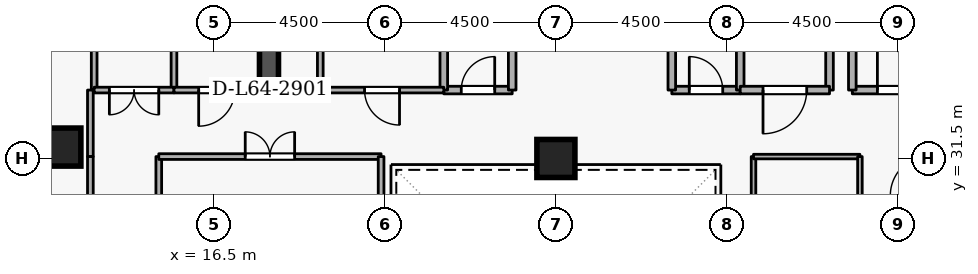
"""IFC4 building model, lengths in metres.
Left out: names, types, materials, properties, quantities, classifications, styles, units other than length and angle.
Written with IfcOpenShell. Run it as: python <this file> out.ifc"""

import sys

from ifc_helpers import new_model, si_unit, direction, frame, frame_2d, origin, origin_2d, place, context, subcontext, project, spatial, rectangle, extrude, element, fill, save


model = new_model("IFC4")
c1 = context("Model", 3, precision=1e-05, world=origin(), true_north=direction((0.0, 1.0)))
c2 = subcontext(c1, "Body", "Model", "MODEL_VIEW")
j1 = project(units=[si_unit("LENGTHUNIT", "METRE"), si_unit("PLANEANGLEUNIT", "RADIAN")], contexts=[c1])
p1 = place(None, origin())
s1 = spatial("IfcSite", under=j1, at=p1, CompositionType="ELEMENT")
p2 = place(p1, origin())
s2 = spatial("IfcBuilding", under=s1, at=p2, CompositionType="ELEMENT")
p3 = place(p2, frame((0.0, 0.0, 240.3)))
s3 = spatial("IfcBuildingStorey", under=s2, at=p3, CompositionType="ELEMENT", Elevation=240.3)
p4 = place(p3, frame((17.95, 33.1, 0.0), z_axis=(0.0, 0.0, 1.0), x_axis=(0.0, 1.0, 0.0)))
e1 = element("IfcWall", 1, at=p4, inside=s3, PredefinedType="SHEAR", context=c2, shape_type="SweptSolid", body=[
    extrude(rectangle(XDim=5.8, YDim=0.5, at=frame_2d((2.9, 0.0))), origin(), (0.0, 0.0, 1.0), 3.6),
])
for number, where, z_axis, x_axis in (
    (2, (12.5, 31.8, 0.0), (0.0, 0.0, 1.0), (1.0, 0.0, 0.0)),
    (3, (25.5, 31.5, 0.0), (0.0, 0.0, 1.0), (1.0, 0.0, 0.0)),
):
    element("IfcColumn", number, at=place(p3, frame(where, z_axis=z_axis, x_axis=x_axis)), inside=s3, PredefinedType="COLUMN", context=c2, shape_type="SweptSolid", body=[
        extrude(rectangle(XDim=1.0, YDim=1.0, at=origin_2d()), origin(), (0.0, 0.0, 1.0), 3.6),
    ])
p5 = place(p3, frame((33.3, 33.3, 0.0), z_axis=(0.0, 0.0, 1.0), x_axis=(1.0, 0.0, 0.0)))
e4 = element("IfcWall", 4, at=p5, inside=s3, PredefinedType="STANDARD", context=c2, shape_type="SweptSolid", body=[
    extrude(rectangle(XDim=2.5, YDim=0.2, at=frame_2d((1.25, 0.0))), origin(), (0.0, 0.0, 1.0), 3.34),
])
p6 = place(p5, frame((0.66, 0.0, 0.0)))
e5 = element("IfcOpeningElement", 5, at=p6, cuts=e4, PredefinedType="OPENING", context=c2, shape_type="SweptSolid", body=[
    extrude(rectangle(XDim=1.15, YDim=2.1, at=frame_2d((0.575, 1.05))), frame((0.0, 0.11, 0.0), z_axis=(0.0, -1.0, 0.0), x_axis=(1.0, 0.0, 0.0)), (0.0, 0.0, 1.0), 0.22),
])
p7 = place(p3, frame((33.3, 35.6, 0.0), z_axis=(0.0, 0.0, 1.0), x_axis=(0.0, -1.0, 0.0)))
e6 = element("IfcWall", 6, at=p7, inside=s3, PredefinedType="STANDARD", context=c2, shape_type="SweptSolid", body=[
    extrude(rectangle(XDim=2.3, YDim=0.2, at=frame_2d((1.15, 0.0))), origin(), (0.0, 0.0, 1.0), 2.545),
])
p8 = place(p3, frame((22.55, 33.3, 0.0), z_axis=(0.0, 0.0, 1.0), x_axis=(1.0, 0.0, 0.0)))
e7 = element("IfcWall", 7, at=p8, inside=s3, PredefinedType="STANDARD", context=c2, shape_type="SweptSolid", body=[
    extrude(rectangle(XDim=1.8, YDim=0.2, at=frame_2d((0.9, 0.0))), origin(), (0.0, 0.0, 1.0), 3.34),
])
p9 = place(p8, frame((0.46, 0.0, 0.0)))
e8 = element("IfcOpeningElement", 8, at=p9, cuts=e7, PredefinedType="OPENING", context=c2, shape_type="SweptSolid", body=[
    extrude(rectangle(XDim=0.88, YDim=2.04, at=frame_2d((0.44, 1.02))), frame((0.0, 0.11, 0.0), z_axis=(0.0, -1.0, 0.0), x_axis=(1.0, 0.0, 0.0)), (0.0, 0.0, 1.0), 0.22),
])
for number, where, z_axis, x_axis in (
    (9, (24.35, 33.3, 0.0), (0.0, 0.0, 1.0), (0.0, 1.0, 0.0)),
    (10, (22.55, 35.35, 0.0), (0.0, 0.0, 1.0), (0.0, -1.0, 0.0)),
):
    element("IfcWall", number, at=place(p3, frame(where, z_axis=z_axis, x_axis=x_axis)), inside=s3, PredefinedType="STANDARD", context=c2, shape_type="SweptSolid", body=[
        extrude(rectangle(XDim=2.05, YDim=0.2, at=frame_2d((1.025, 0.0))), origin(), (0.0, 0.0, 1.0), 3.34),
    ])
p10 = place(p3, frame((28.55, 33.3, 0.0), z_axis=(0.0, 0.0, 1.0), x_axis=(1.0, 0.0, 0.0)))
e11 = element("IfcWall", 11, at=p10, inside=s3, PredefinedType="STANDARD", context=c2, shape_type="SweptSolid", body=[
    extrude(rectangle(XDim=1.8, YDim=0.2, at=frame_2d((0.9, 0.0))), origin(), (0.0, 0.0, 1.0), 3.34),
])
p11 = place(p10, frame((0.46, 0.0, 0.0)))
e12 = element("IfcOpeningElement", 12, at=p11, cuts=e11, PredefinedType="OPENING", context=c2, shape_type="SweptSolid", body=[
    extrude(rectangle(XDim=0.88, YDim=2.04, at=frame_2d((0.44, 1.02))), frame((0.0, 0.11, 0.0), z_axis=(0.0, -1.0, 0.0), x_axis=(1.0, 0.0, 0.0)), (0.0, 0.0, 1.0), 0.22),
])
for number, where, z_axis, x_axis in (
    (13, (30.35, 33.3, 0.0), (0.0, 0.0, 1.0), (0.0, 1.0, 0.0)),
    (14, (28.55, 35.35, 0.0), (0.0, 0.0, 1.0), (0.0, -1.0, 0.0)),
):
    element("IfcWall", number, at=place(p3, frame(where, z_axis=z_axis, x_axis=x_axis)), inside=s3, PredefinedType="STANDARD", context=c2, shape_type="SweptSolid", body=[
        extrude(rectangle(XDim=2.05, YDim=0.2, at=frame_2d((1.025, 0.0))), origin(), (0.0, 0.0, 1.0), 3.34),
    ])
p12 = place(p3, frame((32.7, 35.35, 0.0), z_axis=(0.0, 0.0, 1.0), x_axis=(0.0, -1.0, 0.0)))
e15 = element("IfcWall", 15, at=p12, inside=s3, PredefinedType="STANDARD", context=c2, shape_type="SweptSolid", body=[
    extrude(rectangle(XDim=2.05, YDim=0.2, at=frame_2d((1.025, 0.0))), origin(), (0.0, 0.0, 1.0), 2.545),
])
p13 = place(p3, frame((32.7, 33.3, 0.0), z_axis=(0.0, 0.0, 1.0), x_axis=(-1.0, 0.0, 0.0)))
e16 = element("IfcWall", 16, at=p13, inside=s3, PredefinedType="STANDARD", context=c2, shape_type="SweptSolid", body=[
    extrude(rectangle(XDim=2.35, YDim=0.2, at=frame_2d((1.175, 0.0))), origin(), (0.0, 0.0, 1.0), 3.34),
])
p14 = place(p13, frame((0.6, 0.0, 0.0)))
e17 = element("IfcOpeningElement", 17, at=p14, cuts=e16, PredefinedType="OPENING", context=c2, shape_type="SweptSolid", body=[
    extrude(rectangle(XDim=1.15, YDim=2.1, at=frame_2d((0.575, 1.05))), frame((0.0, 0.11, 0.0), z_axis=(0.0, -1.0, 0.0), x_axis=(1.0, 0.0, 0.0)), (0.0, 0.0, 1.0), 0.22),
])
p15 = place(p3, frame((19.3, 33.3, 0.0), z_axis=(0.0, 0.0, 1.0), x_axis=(0.0, 1.0, 0.0)))
e18 = element("IfcWall", 18, at=p15, inside=s3, PredefinedType="PARTITIONING", context=c2, shape_type="SweptSolid", body=[
    extrude(rectangle(XDim=2.05, YDim=0.15, at=frame_2d((1.025, 0.0))), origin(), (0.0, 0.0, 1.0), 3.34),
])
p16 = place(p3, frame((22.55, 33.3, 0.0), z_axis=(0.0, 0.0, 1.0), x_axis=(-1.0, 0.0, 0.0)))
e19 = element("IfcWall", 19, at=p16, inside=s3, PredefinedType="PARTITIONING", context=c2, shape_type="SweptSolid", body=[
    extrude(rectangle(XDim=3.25, YDim=0.15, at=frame_2d((1.625, 0.0))), origin(), (0.0, 0.0, 1.0), 3.34),
])
p17 = place(p16, frame((1.165, 0.0, 0.0)))
e20 = element("IfcOpeningElement", 20, at=p17, cuts=e19, PredefinedType="OPENING", context=c2, shape_type="SweptSolid", body=[
    extrude(rectangle(XDim=0.92, YDim=2.08, at=frame_2d((0.46, 1.04))), frame((0.0, 0.085, 0.0), z_axis=(0.0, -1.0, 0.0), x_axis=(1.0, 0.0, 0.0)), (0.0, 0.0, 1.0), 0.17),
])
for number, where, z_axis, x_axis in (
    (21, (13.35, 33.3, 0.0), (0.0, 0.0, 1.0), (0.0, 1.0, 0.0)),
    (22, (15.45, 44.72, 0.0), (0.0, 0.0, 1.0), (0.0, -1.0, 0.0)),
):
    element("IfcWall", number, at=place(p3, frame(where, z_axis=z_axis, x_axis=x_axis)), inside=s3, PredefinedType="PARTITIONING", context=c2, shape_type="SweptSolid", body=[
        extrude(rectangle(XDim=11.42, YDim=0.15, at=frame_2d((5.71, 0.0))), origin(), (0.0, 0.0, 1.0), 3.34),
    ])
p18 = place(p3, frame((15.45, 33.3, 0.0), z_axis=(0.0, 0.0, 1.0), x_axis=(-1.0, 0.0, 0.0)))
e23 = element("IfcWall", 23, at=p18, inside=s3, PredefinedType="PARTITIONING", context=c2, shape_type="SweptSolid", body=[
    extrude(rectangle(XDim=2.1, YDim=0.15, at=frame_2d((1.05, 0.0))), origin(), (0.0, 0.0, 1.0), 3.34),
])
p19 = place(p18, frame((0.4, 0.0, 0.0)))
e24 = element("IfcOpeningElement", 24, at=p19, cuts=e23, PredefinedType="OPENING", context=c2, shape_type="SweptSolid", body=[
    extrude(rectangle(XDim=1.3, YDim=2.12, at=frame_2d((0.65, 1.06))), frame((0.0, 0.085, 0.0), z_axis=(0.0, -1.0, 0.0), x_axis=(1.0, 0.0, 0.0)), (0.0, 0.0, 1.0), 0.17),
])
p20 = place(p3, frame((17.7, 33.3, 0.0), z_axis=(0.0, 0.0, 1.0), x_axis=(-1.0, 0.0, 0.0)))
e25 = element("IfcWall", 25, at=p20, inside=s3, PredefinedType="PARTITIONING", context=c2, shape_type="SweptSolid", body=[
    extrude(rectangle(XDim=2.25, YDim=0.15, at=frame_2d((1.125, 0.0))), origin(), (0.0, 0.0, 1.0), 3.34),
])
p21 = place(p20, frame((0.65, 0.0, 0.0)))
e26 = element("IfcOpeningElement", 26, at=p21, cuts=e25, PredefinedType="OPENING", context=c2, shape_type="SweptSolid", body=[
    extrude(rectangle(XDim=0.95, YDim=2.1, at=frame_2d((0.475, 1.05))), frame((0.0, 0.085, 0.0), z_axis=(0.0, -1.0, 0.0), x_axis=(1.0, 0.0, 0.0)), (0.0, 0.0, 1.0), 0.17),
])
p22 = place(p3, frame((13.25, 33.3, 0.0), z_axis=(0.0, 0.0, 1.0), x_axis=(0.0, -1.0, 0.0)))
e27 = element("IfcWall", 27, at=p22, inside=s3, PredefinedType="PARTITIONING", context=c2, shape_type="SweptSolid", body=[
    extrude(rectangle(XDim=1.75, YDim=0.15, at=frame_2d((0.875, 0.0))), origin(), (0.0, 0.0, 1.0), 3.34),
])
p23 = place(p3, frame((13.25, 31.55, 0.0), z_axis=(0.0, 0.0, 1.0), x_axis=(0.0, -1.0, 0.0)))
e28 = element("IfcWall", 28, at=p23, inside=s3, PredefinedType="PARTITIONING", context=c2, shape_type="SweptSolid", body=[
    extrude(rectangle(XDim=3.35, YDim=0.15, at=frame_2d((1.675, 0.0))), origin(), (0.0, 0.0, 1.0), 3.34),
])
p24 = place(p23, frame((1.025, 0.0, 0.0)))
e29 = element("IfcOpeningElement", 29, at=p24, cuts=e28, PredefinedType="OPENING", context=c2, shape_type="SweptSolid", body=[
    extrude(rectangle(XDim=1.3, YDim=2.12, at=frame_2d((0.65, 1.06))), frame((0.0, 0.085, 0.0), z_axis=(0.0, -1.0, 0.0), x_axis=(1.0, 0.0, 0.0)), (0.0, 0.0, 1.0), 0.17),
])
p25 = place(p3, frame((15.05, 28.2, 0.0), z_axis=(0.0, 0.0, 1.0), x_axis=(0.0, 1.0, 0.0)))
e30 = element("IfcWall", 30, at=p25, inside=s3, PredefinedType="PARTITIONING", context=c2, shape_type="SweptSolid", body=[
    extrude(rectangle(XDim=3.35, YDim=0.15, at=frame_2d((1.675, 0.0))), origin(), (0.0, 0.0, 1.0), 3.34),
])
p26 = place(p3, frame((15.05, 31.55, 0.0), z_axis=(0.0, 0.0, 1.0), x_axis=(1.0, 0.0, 0.0)))
e31 = element("IfcWall", 31, at=p26, inside=s3, PredefinedType="PARTITIONING", context=c2, shape_type="SweptSolid", body=[
    extrude(rectangle(XDim=5.85, YDim=0.15, at=frame_2d((2.925, 0.0))), origin(), (0.0, 0.0, 1.0), 3.34),
])
p27 = place(p26, frame((2.275, 0.0, 0.0)))
e32 = element("IfcOpeningElement", 32, at=p27, cuts=e31, PredefinedType="OPENING", context=c2, shape_type="SweptSolid", body=[
    extrude(rectangle(XDim=1.3, YDim=2.12, at=frame_2d((0.65, 1.06))), frame((0.0, 0.085, 0.0), z_axis=(0.0, -1.0, 0.0), x_axis=(1.0, 0.0, 0.0)), (0.0, 0.0, 1.0), 0.17),
])
p28 = place(p3, frame((20.9, 31.55, 0.0), z_axis=(0.0, 0.0, 1.0), x_axis=(0.0, -1.0, 0.0)))
e33 = element("IfcWall", 33, at=p28, inside=s3, PredefinedType="PARTITIONING", context=c2, shape_type="SweptSolid", body=[
    extrude(rectangle(XDim=3.35, YDim=0.15, at=frame_2d((1.675, 0.0))), origin(), (0.0, 0.0, 1.0), 3.34),
])
p29 = place(p3, frame((30.7, 27.0, 0.0), z_axis=(0.0, 0.0, 1.0), x_axis=(0.0, 1.0, 0.0)))
e34 = element("IfcWall", 34, at=p29, inside=s3, PredefinedType="PARTITIONING", context=c2, shape_type="SweptSolid", body=[
    extrude(rectangle(XDim=4.55, YDim=0.12, at=frame_2d((2.275, 0.0))), origin(), (0.0, 0.0, 1.0), 3.34),
])
p30 = place(p3, frame((30.7, 31.55, 0.0), z_axis=(0.0, 0.0, 1.0), x_axis=(1.0, 0.0, 0.0)))
e35 = element("IfcWall", 35, at=p30, inside=s3, PredefinedType="PARTITIONING", context=c2, shape_type="SweptSolid", body=[
    extrude(rectangle(XDim=2.8, YDim=0.12, at=frame_2d((1.4, 0.0))), origin(), (0.0, 0.0, 1.0), 3.34),
])
p31 = place(p3, frame((33.5, 31.55, 0.0), z_axis=(0.0, 0.0, 1.0), x_axis=(0.0, -1.0, 0.0)))
e36 = element("IfcWall", 36, at=p31, inside=s3, PredefinedType="PARTITIONING", context=c2, shape_type="SweptSolid", body=[
    extrude(rectangle(XDim=4.55, YDim=0.12, at=frame_2d((2.275, 0.0))), origin(), (0.0, 0.0, 1.0), 3.34),
])
p32 = place(p31, frame((1.8, 0.0, 0.0)))
e37 = element("IfcOpeningElement", 37, at=p32, cuts=e36, PredefinedType="OPENING", context=c2, shape_type="SweptSolid", body=[
    extrude(rectangle(XDim=0.95, YDim=2.1, at=frame_2d((0.475, 1.05))), frame((0.0, 0.07, 0.0), z_axis=(0.0, -1.0, 0.0), x_axis=(1.0, 0.0, 0.0)), (0.0, 0.0, 1.0), 0.14),
])
p33 = place(p6, origin())
e38 = element("IfcDoor", 38, at=p33, inside=s3, OperationType="SINGLE_SWING_LEFT", PredefinedType="DOOR", context=c2, shape_type="SweptSolid", body=[
    extrude(rectangle(XDim=1.15, YDim=2.1, at=frame_2d((0.575, 1.05))), frame((0.0, 0.025, 0.0), z_axis=(0.0, -1.0, 0.0), x_axis=(1.0, 0.0, 0.0)), (0.0, 0.0, 1.0), 0.05),
])
fill(e5, e38)
p34 = place(p9, origin())
e39 = element("IfcDoor", 39, at=p34, inside=s3, OperationType="SINGLE_SWING_RIGHT", PredefinedType="DOOR", context=c2, shape_type="SweptSolid", body=[
    extrude(rectangle(XDim=0.88, YDim=2.04, at=frame_2d((0.44, 1.02))), frame((0.0, 0.025, 0.0), z_axis=(0.0, -1.0, 0.0), x_axis=(1.0, 0.0, 0.0)), (0.0, 0.0, 1.0), 0.05),
])
fill(e8, e39)
p35 = place(p11, origin())
e40 = element("IfcDoor", 40, at=p35, inside=s3, OperationType="SINGLE_SWING_LEFT", PredefinedType="DOOR", context=c2, shape_type="SweptSolid", body=[
    extrude(rectangle(XDim=0.88, YDim=2.04, at=frame_2d((0.44, 1.02))), frame((0.0, 0.025, 0.0), z_axis=(0.0, -1.0, 0.0), x_axis=(1.0, 0.0, 0.0)), (0.0, 0.0, 1.0), 0.05),
])
fill(e12, e40)
p36 = place(p17, origin())
e41 = element("IfcDoor", 41, at=p36, inside=s3, OperationType="SINGLE_SWING_LEFT", PredefinedType="DOOR", context=c2, shape_type="SweptSolid", body=[
    extrude(rectangle(XDim=0.92, YDim=2.08, at=frame_2d((0.46, 1.04))), frame((0.0, 0.025, 0.0), z_axis=(0.0, -1.0, 0.0), x_axis=(1.0, 0.0, 0.0)), (0.0, 0.0, 1.0), 0.05),
])
fill(e20, e41)
p37 = place(p14, origin())
e42 = element("IfcDoor", 42, at=p37, inside=s3, OperationType="SINGLE_SWING_RIGHT", PredefinedType="DOOR", context=c2, shape_type="SweptSolid", body=[
    extrude(rectangle(XDim=1.15, YDim=2.1, at=frame_2d((0.575, 1.05))), frame((0.0, 0.025, 0.0), z_axis=(0.0, -1.0, 0.0), x_axis=(1.0, 0.0, 0.0)), (0.0, 0.0, 1.0), 0.05),
])
fill(e17, e42)
p38 = place(p19, origin())
e43 = element("IfcDoor", 43, at=p38, inside=s3, OperationType="DOUBLE_DOOR_SINGLE_SWING", PredefinedType="DOOR", context=c2, shape_type="SweptSolid", body=[
    extrude(rectangle(XDim=1.3, YDim=2.12, at=frame_2d((0.65, 1.06))), frame((0.0, 0.025, 0.0), z_axis=(0.0, -1.0, 0.0), x_axis=(1.0, 0.0, 0.0)), (0.0, 0.0, 1.0), 0.05),
])
fill(e24, e43)
p39 = place(p21, origin())
e44 = element("IfcDoor", 44, at=p39, inside=s3, OperationType="SINGLE_SWING_RIGHT", PredefinedType="DOOR", context=c2, shape_type="SweptSolid", body=[
    extrude(rectangle(XDim=0.95, YDim=2.1, at=frame_2d((0.475, 1.05))), frame((0.0, 0.025, 0.0), z_axis=(0.0, -1.0, 0.0), x_axis=(1.0, 0.0, 0.0)), (0.0, 0.0, 1.0), 0.05),
])
fill(e26, e44)
p40 = place(p27, origin())
e45 = element("IfcDoor", 45, at=p40, inside=s3, OperationType="DOUBLE_DOOR_SINGLE_SWING", PredefinedType="DOOR", context=c2, shape_type="SweptSolid", body=[
    extrude(rectangle(XDim=1.3, YDim=2.12, at=frame_2d((0.65, 1.06))), frame((0.0, 0.025, 0.0), z_axis=(0.0, -1.0, 0.0), x_axis=(1.0, 0.0, 0.0)), (0.0, 0.0, 1.0), 0.05),
])
fill(e32, e45)
save(model, sys.argv[1])
